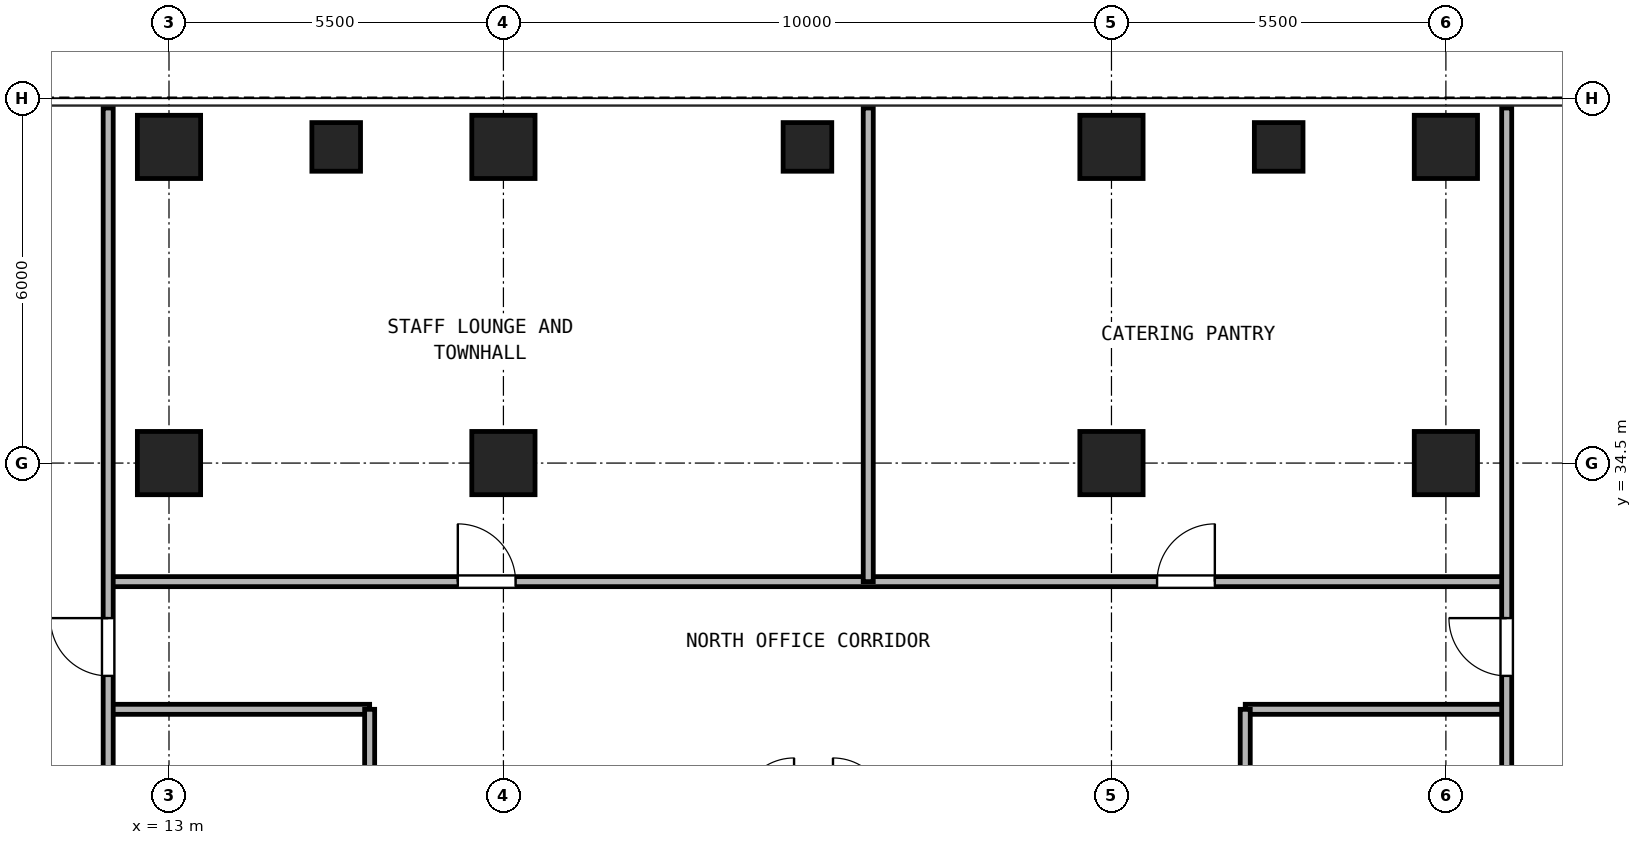
"""IFC4 building model, lengths in metres.
Left out: names, types, materials, properties, quantities, classifications, styles, units other than length and angle.
Written with IfcOpenShell. Run it as: python <this file> out.ifc"""

import sys

from ifc_helpers import new_model, si_unit, direction, frame, frame_2d, origin, origin_2d, place, context, subcontext, project, spatial, rectangle, hollow_rectangle, extrude, source, transform, mapped, element, fill, save


model = new_model("IFC4")
c1 = context("Model", 3, precision=1e-05, world=origin(), true_north=direction((0.0, 1.0)))
c2 = subcontext(c1, "Body", "Model", "MODEL_VIEW")
j1 = project(units=[si_unit("LENGTHUNIT", "METRE"), si_unit("PLANEANGLEUNIT", "RADIAN")], contexts=[c1])
p1 = place(None, origin())
s1 = spatial("IfcSite", under=j1, at=p1, CompositionType="ELEMENT")
p2 = place(p1, origin())
s2 = spatial("IfcBuilding", under=s1, at=p2, CompositionType="ELEMENT")
p3 = place(p2, frame((0.0, 0.0, 58.5)))
s3 = spatial("IfcBuildingStorey", under=s2, at=p3, CompositionType="ELEMENT", Elevation=58.5)
m1 = source(origin(), c2, "Body", "SweptSolid", [
    extrude(hollow_rectangle(XDim=1.04, YDim=1.04, WallThickness=0.065, at=origin_2d()), origin(), (0.0, 0.0, 1.0), 3.32),
])
for number, where, z_axis, x_axis in (
    (1, (13.0, 39.7, 0.0), (0.0, 0.0, 1.0), (1.0, 0.0, 0.0)),
    (2, (18.5, 39.7, 0.0), (0.0, 0.0, 1.0), (1.0, 0.0, 0.0)),
    (3, (28.5, 39.7, 0.0), (0.0, 0.0, 1.0), (1.0, 0.0, 0.0)),
    (4, (34.0, 39.7, 0.0), (0.0, 0.0, 1.0), (1.0, 0.0, 0.0)),
    (5, (13.0, 34.5, 0.0), (0.0, 0.0, 1.0), (1.0, 0.0, 0.0)),
    (6, (18.5, 34.5, 0.0), (0.0, 0.0, 1.0), (1.0, 0.0, 0.0)),
    (7, (28.5, 34.5, 0.0), (0.0, 0.0, 1.0), (1.0, 0.0, 0.0)),
    (8, (34.0, 34.5, 0.0), (0.0, 0.0, 1.0), (1.0, 0.0, 0.0)),
):
    element("IfcColumn", number, at=place(p3, frame(where, z_axis=z_axis, x_axis=x_axis)), inside=s3, PredefinedType="COLUMN", context=c2, shape_type="MappedRepresentation", body=[
        mapped(m1, transform((0.0, 0.0, 0.0), x_axis=(1.0, 0.0, 0.0), y_axis=(0.0, 1.0, 0.0), z_axis=(0.0, 0.0, 1.0), scale=1.0)),
    ])
m2 = source(origin(), c2, "Body", "SweptSolid", [
    extrude(hollow_rectangle(XDim=0.8, YDim=0.8, WallThickness=0.045, at=origin_2d()), origin(), (0.0, 0.0, 1.0), 3.32),
])
for number, where, z_axis, x_axis in (
    (9, (15.75, 39.7, 0.0), (0.0, 0.0, 1.0), (1.0, 0.0, 0.0)),
    (10, (23.5, 39.7, 0.0), (0.0, 0.0, 1.0), (1.0, 0.0, 0.0)),
    (11, (31.25, 39.7, 0.0), (0.0, 0.0, 1.0), (1.0, 0.0, 0.0)),
):
    element("IfcColumn", number, at=place(p3, frame(where, z_axis=z_axis, x_axis=x_axis)), inside=s3, PredefinedType="COLUMN", context=c2, shape_type="MappedRepresentation", body=[
        mapped(m2, transform((0.0, 0.0, 0.0), x_axis=(1.0, 0.0, 0.0), y_axis=(0.0, 1.0, 0.0), z_axis=(0.0, 0.0, 1.0), scale=1.0)),
    ])
p4 = place(p3, frame((12.0, 32.55, 0.0), z_axis=(0.0, 0.0, 1.0), x_axis=(1.0, 0.0, 0.0)))
e12 = element("IfcWall", 12, at=p4, inside=s3, PredefinedType="PARTITIONING", context=c2, shape_type="SweptSolid", body=[
    extrude(rectangle(XDim=23.0, YDim=0.165, at=frame_2d((11.5, 0.0))), origin(), (0.0, 0.0, 1.0), 3.32),
])
p5 = place(p4, frame((5.75, 0.0, 0.0)))
e13 = element("IfcOpeningElement", 13, at=p5, cuts=e12, PredefinedType="OPENING", context=c2, shape_type="SweptSolid", body=[
    extrude(rectangle(XDim=0.95, YDim=2.15, at=frame_2d((0.475, 1.075))), frame((0.0, 0.093, 0.0), z_axis=(0.0, -1.0, 0.0), x_axis=(1.0, 0.0, 0.0)), (0.0, 0.0, 1.0), 0.185),
])
p6 = place(p4, frame((17.25, 0.0, 0.0)))
e14 = element("IfcOpeningElement", 14, at=p6, cuts=e12, PredefinedType="OPENING", context=c2, shape_type="SweptSolid", body=[
    extrude(rectangle(XDim=0.95, YDim=2.15, at=frame_2d((0.475, 1.075))), frame((0.0, 0.093, 0.0), z_axis=(0.0, -1.0, 0.0), x_axis=(1.0, 0.0, 0.0)), (0.0, 0.0, 1.0), 0.185),
])
for number, where, z_axis, x_axis in (
    (15, (12.0, 30.45, 0.0), (0.0, 0.0, 1.0), (1.0, 0.0, 0.0)),
    (16, (30.7, 30.45, 0.0), (0.0, 0.0, 1.0), (1.0, 0.0, 0.0)),
):
    element("IfcWall", number, at=place(p3, frame(where, z_axis=z_axis, x_axis=x_axis)), inside=s3, PredefinedType="PARTITIONING", context=c2, shape_type="SweptSolid", body=[
        extrude(rectangle(XDim=4.3, YDim=0.165, at=frame_2d((2.15, 0.0))), origin(), (0.0, 0.0, 1.0), 3.32),
    ])
p7 = place(p3, frame((16.3, 9.55, 0.0), z_axis=(0.0, 0.0, 1.0), x_axis=(0.0, 1.0, 0.0)))
e17 = element("IfcWall", 17, at=p7, inside=s3, PredefinedType="PARTITIONING", context=c2, shape_type="SweptSolid", body=[
    extrude(rectangle(XDim=20.9, YDim=0.165, at=frame_2d((10.45, 0.0))), origin(), (0.0, 0.0, 1.0), 3.32),
])
p8 = place(p7, frame((6.231, 0.0, 0.0)))
e18 = element("IfcOpeningElement", 18, at=p8, cuts=e17, PredefinedType="OPENING", context=c2, shape_type="SweptSolid", body=[
    extrude(rectangle(XDim=0.95, YDim=2.15, at=frame_2d((0.475, 1.075))), frame((0.0, 0.093, 0.0), z_axis=(0.0, -1.0, 0.0), x_axis=(1.0, 0.0, 0.0)), (0.0, 0.0, 1.0), 0.185),
])
p9 = place(p7, frame((16.681, 0.0, 0.0)))
e19 = element("IfcOpeningElement", 19, at=p9, cuts=e17, PredefinedType="OPENING", context=c2, shape_type="SweptSolid", body=[
    extrude(rectangle(XDim=0.95, YDim=2.15, at=frame_2d((0.475, 1.075))), frame((0.0, 0.093, 0.0), z_axis=(0.0, -1.0, 0.0), x_axis=(1.0, 0.0, 0.0)), (0.0, 0.0, 1.0), 0.185),
])
p10 = place(p3, frame((30.7, 9.55, 0.0), z_axis=(0.0, 0.0, 1.0), x_axis=(0.0, 1.0, 0.0)))
e20 = element("IfcWall", 20, at=p10, inside=s3, PredefinedType="PARTITIONING", context=c2, shape_type="SweptSolid", body=[
    extrude(rectangle(XDim=20.9, YDim=0.165, at=frame_2d((10.45, 0.0))), origin(), (0.0, 0.0, 1.0), 3.32),
])
p11 = place(p10, frame((9.95, 0.0, 0.0)))
e21 = element("IfcOpeningElement", 21, at=p11, cuts=e20, PredefinedType="OPENING", context=c2, shape_type="SweptSolid", body=[
    extrude(rectangle(XDim=0.95, YDim=2.15, at=frame_2d((0.475, 1.075))), frame((0.0, 0.093, 0.0), z_axis=(0.0, -1.0, 0.0), x_axis=(1.0, 0.0, 0.0)), (0.0, 0.0, 1.0), 0.185),
])
p12 = place(p3, frame((12.0, 0.16, 0.0), z_axis=(0.0, 0.0, 1.0), x_axis=(0.0, 1.0, 0.0)))
e22 = element("IfcWall", 22, at=p12, inside=s3, PredefinedType="PARTITIONING", context=c2, shape_type="SweptSolid", body=[
    extrude(rectangle(XDim=40.18, YDim=0.165, at=frame_2d((20.09, 0.0))), origin(), (0.0, 0.0, 1.0), 3.32),
])
p13 = place(p12, frame((7.84, 0.0, 0.0)))
e23 = element("IfcOpeningElement", 23, at=p13, cuts=e22, PredefinedType="OPENING", context=c2, shape_type="SweptSolid", body=[
    extrude(rectangle(XDim=0.95, YDim=2.15, at=frame_2d((0.475, 1.075))), frame((0.0, 0.093, 0.0), z_axis=(0.0, -1.0, 0.0), x_axis=(1.0, 0.0, 0.0)), (0.0, 0.0, 1.0), 0.185),
])
p14 = place(p12, frame((30.84, 0.0, 0.0)))
e24 = element("IfcOpeningElement", 24, at=p14, cuts=e22, PredefinedType="OPENING", context=c2, shape_type="SweptSolid", body=[
    extrude(rectangle(XDim=0.95, YDim=2.15, at=frame_2d((0.475, 1.075))), frame((0.0, 0.093, 0.0), z_axis=(0.0, -1.0, 0.0), x_axis=(1.0, 0.0, 0.0)), (0.0, 0.0, 1.0), 0.185),
])
p15 = place(p3, frame((35.0, 0.16, 0.0), z_axis=(0.0, 0.0, 1.0), x_axis=(0.0, 1.0, 0.0)))
e25 = element("IfcWall", 25, at=p15, inside=s3, PredefinedType="PARTITIONING", context=c2, shape_type="SweptSolid", body=[
    extrude(rectangle(XDim=40.18, YDim=0.165, at=frame_2d((20.09, 0.0))), origin(), (0.0, 0.0, 1.0), 3.32),
])
p16 = place(p15, frame((7.84, 0.0, 0.0)))
e26 = element("IfcOpeningElement", 26, at=p16, cuts=e25, PredefinedType="OPENING", context=c2, shape_type="SweptSolid", body=[
    extrude(rectangle(XDim=0.95, YDim=2.15, at=frame_2d((0.475, 1.075))), frame((0.0, 0.093, 0.0), z_axis=(0.0, -1.0, 0.0), x_axis=(1.0, 0.0, 0.0)), (0.0, 0.0, 1.0), 0.185),
])
p17 = place(p15, frame((30.84, 0.0, 0.0)))
e27 = element("IfcOpeningElement", 27, at=p17, cuts=e25, PredefinedType="OPENING", context=c2, shape_type="SweptSolid", body=[
    extrude(rectangle(XDim=0.95, YDim=2.15, at=frame_2d((0.475, 1.075))), frame((0.0, 0.093, 0.0), z_axis=(0.0, -1.0, 0.0), x_axis=(1.0, 0.0, 0.0)), (0.0, 0.0, 1.0), 0.185),
])
p18 = place(p3, frame((24.5, 32.55, 0.0), z_axis=(0.0, 0.0, 1.0), x_axis=(0.0, 1.0, 0.0)))
e28 = element("IfcWall", 28, at=p18, inside=s3, PredefinedType="PARTITIONING", context=c2, shape_type="SweptSolid", body=[
    extrude(rectangle(XDim=7.79, YDim=0.165, at=frame_2d((3.895, 0.0))), origin(), (0.0, 0.0, 1.0), 3.32),
])
p19 = place(p5, origin())
e29 = element("IfcDoor", 29, at=p19, inside=s3, OperationType="SINGLE_SWING_LEFT", PredefinedType="DOOR", context=c2, shape_type="SweptSolid", body=[
    extrude(rectangle(XDim=0.95, YDim=2.15, at=frame_2d((0.475, 1.075))), frame((0.0, 0.025, 0.0), z_axis=(0.0, -1.0, 0.0), x_axis=(1.0, 0.0, 0.0)), (0.0, 0.0, 1.0), 0.05),
])
fill(e13, e29)
p20 = place(p6, origin())
e30 = element("IfcDoor", 30, at=p20, inside=s3, OperationType="SINGLE_SWING_RIGHT", PredefinedType="DOOR", context=c2, shape_type="SweptSolid", body=[
    extrude(rectangle(XDim=0.95, YDim=2.15, at=frame_2d((0.475, 1.075))), frame((0.0, 0.025, 0.0), z_axis=(0.0, -1.0, 0.0), x_axis=(1.0, 0.0, 0.0)), (0.0, 0.0, 1.0), 0.05),
])
fill(e14, e30)
p21 = place(p14, frame((0.95, 0.0, 0.0), z_axis=(0.0, 0.0, 1.0), x_axis=(-1.0, 0.0, 0.0)))
e31 = element("IfcDoor", 31, at=p21, inside=s3, OperationType="SINGLE_SWING_RIGHT", PredefinedType="DOOR", context=c2, shape_type="SweptSolid", body=[
    extrude(rectangle(XDim=0.95, YDim=2.15, at=frame_2d((0.475, 1.075))), frame((0.0, 0.025, 0.0), z_axis=(0.0, -1.0, 0.0), x_axis=(1.0, 0.0, 0.0)), (0.0, 0.0, 1.0), 0.05),
])
fill(e24, e31)
p22 = place(p17, origin())
e32 = element("IfcDoor", 32, at=p22, inside=s3, OperationType="SINGLE_SWING_RIGHT", PredefinedType="DOOR", context=c2, shape_type="SweptSolid", body=[
    extrude(rectangle(XDim=0.95, YDim=2.15, at=frame_2d((0.475, 1.075))), frame((0.0, 0.025, 0.0), z_axis=(0.0, -1.0, 0.0), x_axis=(1.0, 0.0, 0.0)), (0.0, 0.0, 1.0), 0.05),
])
fill(e27, e32)
save(model, sys.argv[1])
